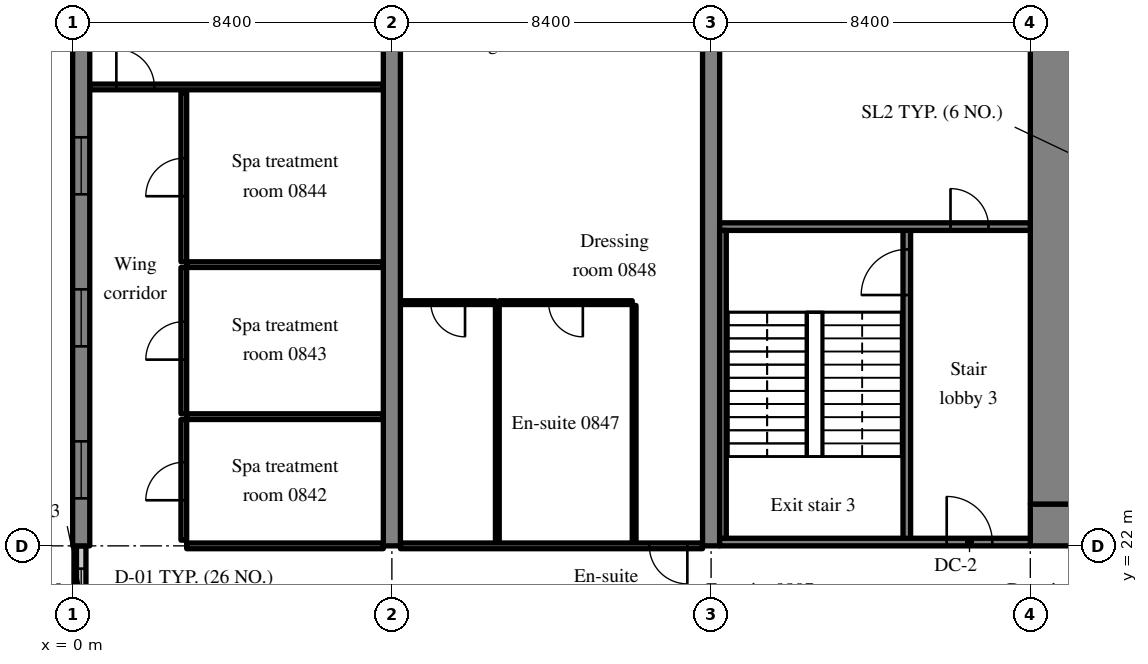
"""IFC4 building model, lengths in metres.
Left out: names, types, materials, properties, quantities, classifications, styles, units other than length and angle.
Written with IfcOpenShell. Run it as: python <this file> out.ifc"""

import sys

from ifc_helpers import new_model, si_unit, direction, frame, frame_2d, origin, place, context, subcontext, project, spatial, rectangle, extrude, source, transform, mapped, element, fill, save


model = new_model("IFC4")
c1 = context("Model", 3, precision=1e-05, world=origin(), true_north=direction((0.0, 1.0)))
c2 = subcontext(c1, "Body", "Model", "MODEL_VIEW")
j1 = project(units=[si_unit("LENGTHUNIT", "METRE"), si_unit("PLANEANGLEUNIT", "RADIAN")], contexts=[c1])
p1 = place(None, origin())
s1 = spatial("IfcSite", under=j1, at=p1, CompositionType="ELEMENT")
p2 = place(p1, origin())
s2 = spatial("IfcBuilding", under=s1, at=p2, CompositionType="ELEMENT")
p3 = place(p2, frame((0.0, 0.0, 39.2)))
s3 = spatial("IfcBuildingStorey", under=s2, at=p3, CompositionType="ELEMENT", Elevation=39.2)
m1 = source(origin(), c2, "Body", "SweptSolid", [
    extrude(rectangle(XDim=50.4, YDim=1.1, at=frame_2d((25.2, 0.0))), origin(), (0.0, 0.0, 1.0), 3.52),
])
p4 = place(p3, frame((25.2, 22.55, 0.0), z_axis=(0.0, 0.0, 1.0), x_axis=(1.0, 0.0, 0.0)))
e1 = element("IfcWall", 1, at=p4, inside=s3, PredefinedType="SHEAR", context=c2, shape_type="MappedRepresentation", body=[
    mapped(m1, transform((0.0, 0.0, 0.0), scale=1.0)),
])
m2 = source(origin(), c2, "Body", "SweptSolid", [
    extrude(rectangle(XDim=1.8, YDim=2.1, at=frame_2d((0.9, 1.05))), frame((0.0, 0.56, 0.0), z_axis=(0.0, -1.0, 0.0), x_axis=(1.0, 0.0, 0.0)), (0.0, 0.0, 1.0), 1.12),
])
p5 = place(p4, frame((15.9, 0.0, 0.0)))
e2 = element("IfcOpeningElement", 2, at=p5, cuts=e1, PredefinedType="OPENING", context=c2, shape_type="MappedRepresentation", body=[
    mapped(m2, transform((0.0, 0.0, 0.0), scale=1.0)),
])
m3 = source(origin(), c2, "Body", "SweptSolid", [
    extrude(rectangle(XDim=1.2, YDim=2.1, at=frame_2d((0.6, 1.05))), frame((0.0, 0.56, 0.0), z_axis=(0.0, -1.0, 0.0), x_axis=(1.0, 0.0, 0.0)), (0.0, 0.0, 1.0), 1.12),
])
p6 = place(p4, frame((27.0, 0.0, 0.0)))
e3 = element("IfcOpeningElement", 3, at=p6, cuts=e1, PredefinedType="OPENING", context=c2, shape_type="MappedRepresentation", body=[
    mapped(m3, transform((0.0, 0.0, 0.0), scale=1.0)),
])
m4 = source(origin(), c2, "Body", "SweptSolid", [
    extrude(rectangle(XDim=0.9, YDim=2.1, at=frame_2d((0.45, 1.05))), frame((0.0, 0.56, 0.0), z_axis=(0.0, -1.0, 0.0), x_axis=(1.0, 0.0, 0.0)), (0.0, 0.0, 1.0), 1.12),
])
p7 = place(p4, frame((33.75, 0.0, 0.0)))
e4 = element("IfcOpeningElement", 4, at=p7, cuts=e1, PredefinedType="OPENING", context=c2, shape_type="MappedRepresentation", body=[
    mapped(m4, transform((0.0, 0.0, 0.0), scale=1.0)),
])
p8 = place(p4, frame((30.75, 0.0, 0.0)))
e5 = element("IfcOpeningElement", 5, at=p8, cuts=e1, PredefinedType="OPENING", context=c2, shape_type="MappedRepresentation", body=[
    mapped(m4, transform((0.0, 0.0, 0.0), scale=1.0)),
])
p9 = place(p4, frame((39.75, 0.0, 0.0)))
e6 = element("IfcOpeningElement", 6, at=p9, cuts=e1, PredefinedType="OPENING", context=c2, shape_type="MappedRepresentation", body=[
    mapped(m4, transform((0.0, 0.0, 0.0), scale=1.0)),
])
p10 = place(p4, frame((36.75, 0.0, 0.0)))
e7 = element("IfcOpeningElement", 7, at=p10, cuts=e1, PredefinedType="OPENING", context=c2, shape_type="MappedRepresentation", body=[
    mapped(m4, transform((0.0, 0.0, 0.0), scale=1.0)),
])
p11 = place(p4, frame((6.425, 0.0, 0.0)))
e8 = element("IfcOpeningElement", 8, at=p11, cuts=e1, PredefinedType="OPENING", context=c2, shape_type="MappedRepresentation", body=[
    mapped(m3, transform((0.0, 0.0, 0.0), scale=1.0)),
])
p12 = place(p4, frame((47.675, 0.0, 0.0)))
e9 = element("IfcOpeningElement", 9, at=p12, cuts=e1, PredefinedType="OPENING", context=c2, shape_type="MappedRepresentation", body=[
    mapped(m3, transform((0.0, 0.0, 0.0), scale=1.0)),
])
m5 = source(origin(), c2, "Body", "SweptSolid", [
    extrude(rectangle(XDim=17.8, YDim=1.1, at=frame_2d((8.9, 0.0))), origin(), (0.0, 0.0, 1.0), 3.52),
])
p13 = place(p3, frame((25.75, 23.1, 0.0), z_axis=(0.0, 0.0, 1.0), x_axis=(0.0, 1.0, 0.0)))
e10 = element("IfcWall", 10, at=p13, inside=s3, PredefinedType="SHEAR", context=c2, shape_type="MappedRepresentation", body=[
    mapped(m5, transform((0.0, 0.0, 0.0), scale=1.0)),
])
m6 = source(origin(), c2, "Body", "SweptSolid", [
    extrude(rectangle(XDim=16.0, YDim=0.45, at=frame_2d((8.0, 0.0))), origin(), (0.0, 0.0, 1.0), 3.52),
])
p14 = place(p3, frame((0.225, 22.0, 0.0), z_axis=(0.0, 0.0, 1.0), x_axis=(0.0, 1.0, 0.0)))
e11 = element("IfcWall", 11, at=p14, inside=s3, PredefinedType="SHEAR", context=c2, shape_type="MappedRepresentation", body=[
    mapped(m6, transform((0.0, 0.0, 0.0), scale=1.0)),
])
m7 = source(origin(), c2, "Body", "SweptSolid", [
    extrude(rectangle(XDim=1.5, YDim=1.5, at=frame_2d((0.75, 0.75))), frame((0.0, 0.235, 0.0), z_axis=(0.0, -1.0, 0.0), x_axis=(1.0, 0.0, 0.0)), (0.0, 0.0, 1.0), 0.47),
])
p15 = place(p14, frame((1.25, 0.0, 0.9)))
e12 = element("IfcOpeningElement", 12, at=p15, cuts=e11, PredefinedType="OPENING", context=c2, shape_type="MappedRepresentation", body=[
    mapped(m7, transform((0.0, 0.0, 0.0), scale=1.0)),
])
p16 = place(p14, frame((5.25, 0.0, 0.9)))
e13 = element("IfcOpeningElement", 13, at=p16, cuts=e11, PredefinedType="OPENING", context=c2, shape_type="MappedRepresentation", body=[
    mapped(m7, transform((0.0, 0.0, 0.0), scale=1.0)),
])
p17 = place(p14, frame((9.25, 0.0, 0.9)))
e14 = element("IfcOpeningElement", 14, at=p17, cuts=e11, PredefinedType="OPENING", context=c2, shape_type="MappedRepresentation", body=[
    mapped(m7, transform((0.0, 0.0, 0.0), scale=1.0)),
])
p18 = place(p14, frame((13.25, 0.0, 0.9)))
e15 = element("IfcOpeningElement", 15, at=p18, cuts=e11, PredefinedType="OPENING", context=c2, shape_type="MappedRepresentation", body=[
    mapped(m7, transform((0.0, 0.0, 0.0), scale=1.0)),
])
m8 = source(origin(), c2, "Body", "SweptSolid", [
    extrude(rectangle(XDim=20.0, YDim=0.45, at=frame_2d((10.0, 0.0))), origin(), (0.0, 0.0, 1.0), 3.52),
])
for number, where, z_axis, x_axis in (
    (16, (8.4, 22.0, 0.0), (0.0, 0.0, 1.0), (0.0, 1.0, 0.0)),
    (17, (16.8, 22.0, 0.0), (0.0, 0.0, 1.0), (0.0, 1.0, 0.0)),
):
    element("IfcWall", number, at=place(p3, frame(where, z_axis=z_axis, x_axis=x_axis)), inside=s3, PredefinedType="SHEAR", context=c2, shape_type="MappedRepresentation", body=[
        mapped(m8, transform((0.0, 0.0, 0.0), scale=1.0)),
    ])
m9 = source(origin(), c2, "Body", "SweptSolid", [
    extrude(rectangle(XDim=2.4, YDim=0.25, at=frame_2d((1.2, 0.0))), origin(), (0.0, 0.0, 1.0), 2.62),
])
p19 = place(p3, frame((0.225, 19.6, 0.0), z_axis=(0.0, 0.0, 1.0), x_axis=(0.0, 1.0, 0.0)))
e18 = element("IfcWall", 18, at=p19, inside=s3, PredefinedType="SOLIDWALL", context=c2, shape_type="MappedRepresentation", body=[
    mapped(m9, transform((0.0, 0.0, 0.0), scale=1.0)),
])
m10 = source(origin(), c2, "Body", "SweptSolid", [
    extrude(rectangle(XDim=1.2, YDim=1.5, at=frame_2d((0.6, 0.75))), frame((0.0, 0.135, 0.0), z_axis=(0.0, -1.0, 0.0), x_axis=(1.0, 0.0, 0.0)), (0.0, 0.0, 1.0), 0.27),
])
p20 = place(p19, frame((0.6, 0.0, 0.9)))
e19 = element("IfcOpeningElement", 19, at=p20, cuts=e18, PredefinedType="OPENING", context=c2, shape_type="MappedRepresentation", body=[
    mapped(m10, transform((0.0, 0.0, 0.0), scale=1.0)),
])
m11 = source(origin(), c2, "Body", "SweptSolid", [
    extrude(rectangle(XDim=8.3, YDim=0.2, at=frame_2d((4.15, 0.0))), origin(), (0.0, 0.0, 1.0), 3.52),
])
p21 = place(p3, frame((21.95, 22.1, 0.0), z_axis=(0.0, 0.0, 1.0), x_axis=(0.0, 1.0, 0.0)))
e20 = element("IfcWall", 20, at=p21, inside=s3, PredefinedType="SOLIDWALL", context=c2, shape_type="MappedRepresentation", body=[
    mapped(m11, transform((0.0, 0.0, 0.0), scale=1.0)),
])
m12 = source(origin(), c2, "Body", "SweptSolid", [
    extrude(rectangle(XDim=1.2, YDim=2.1, at=frame_2d((0.6, 1.05))), frame((0.0, 0.11, 0.0), z_axis=(0.0, -1.0, 0.0), x_axis=(1.0, 0.0, 0.0)), (0.0, 0.0, 1.0), 0.22),
])
p22 = place(p21, frame((6.5, 0.0, 0.0)))
e21 = element("IfcOpeningElement", 21, at=p22, cuts=e20, PredefinedType="OPENING", context=c2, shape_type="MappedRepresentation", body=[
    mapped(m12, transform((0.0, 0.0, 0.0), scale=1.0)),
])
m13 = source(origin(), c2, "Body", "SweptSolid", [
    extrude(rectangle(XDim=8.175, YDim=0.2, at=frame_2d((4.087, 0.0))), origin(), (0.0, 0.0, 1.0), 3.52),
])
p23 = place(p3, frame((17.025, 22.1, 0.0), z_axis=(0.0, 0.0, 1.0), x_axis=(1.0, 0.0, 0.0)))
e22 = element("IfcWall", 22, at=p23, inside=s3, PredefinedType="SOLIDWALL", context=c2, shape_type="MappedRepresentation", body=[
    mapped(m13, transform((0.0, 0.0, 0.0), scale=1.0)),
])
p24 = place(p23, frame((5.975, 0.0, 0.0)))
e23 = element("IfcOpeningElement", 23, at=p24, cuts=e22, PredefinedType="OPENING", context=c2, shape_type="MappedRepresentation", body=[
    mapped(m12, transform((0.0, 0.0, 0.0), scale=1.0)),
])
p25 = place(p3, frame((17.025, 30.4, 0.0), z_axis=(0.0, 0.0, 1.0), x_axis=(1.0, 0.0, 0.0)))
e24 = element("IfcWall", 24, at=p25, inside=s3, PredefinedType="SOLIDWALL", context=c2, shape_type="MappedRepresentation", body=[
    mapped(m13, transform((0.0, 0.0, 0.0), scale=1.0)),
])
m14 = source(origin(), c2, "Body", "SweptSolid", [
    extrude(rectangle(XDim=1.0, YDim=2.1, at=frame_2d((0.5, 1.05))), frame((0.0, 0.11, 0.0), z_axis=(0.0, -1.0, 0.0), x_axis=(1.0, 0.0, 0.0)), (0.0, 0.0, 1.0), 0.22),
])
p26 = place(p25, frame((6.075, 0.0, 0.0)))
e25 = element("IfcOpeningElement", 25, at=p26, cuts=e24, PredefinedType="OPENING", context=c2, shape_type="MappedRepresentation", body=[
    mapped(m14, transform((0.0, 0.0, 0.0), scale=1.0)),
])
m15 = source(origin(), c2, "Body", "SweptSolid", [
    extrude(rectangle(XDim=8.1, YDim=0.175, at=frame_2d((4.05, 0.0))), origin(), (0.0, 0.0, 1.0), 3.52),
])
p27 = place(p3, frame((17.112, 22.2, 0.0), z_axis=(0.0, 0.0, 1.0), x_axis=(0.0, 1.0, 0.0)))
e26 = element("IfcWall", 26, at=p27, inside=s3, PredefinedType="SOLIDWALL", context=c2, shape_type="MappedRepresentation", body=[
    mapped(m15, transform((0.0, 0.0, 0.0), scale=1.0)),
])
m16 = source(origin(), c2, "Body", "SweptSolid", [
    extrude(rectangle(XDim=5.175, YDim=0.15, at=frame_2d((2.587, 0.0))), origin(), (0.0, 0.0, 1.0), 2.82),
])
p28 = place(p3, frame((3.0, 22.0, 0.0), z_axis=(0.0, 0.0, 1.0), x_axis=(1.0, 0.0, 0.0)))
e27 = element("IfcWall", 27, at=p28, inside=s3, PredefinedType="PARTITIONING", context=c2, shape_type="MappedRepresentation", body=[
    mapped(m16, transform((0.0, 0.0, 0.0), scale=1.0)),
])
m17 = source(origin(), c2, "Body", "SweptSolid", [
    extrude(rectangle(XDim=3.175, YDim=0.15, at=frame_2d((1.587, 0.0))), origin(), (0.0, 0.0, 1.0), 3.52),
])
p29 = place(p3, frame((2.925, 22.15, 0.0), z_axis=(0.0, 0.0, 1.0), x_axis=(0.0, 1.0, 0.0)))
e28 = element("IfcWall", 28, at=p29, inside=s3, PredefinedType="PARTITIONING", context=c2, shape_type="MappedRepresentation", body=[
    mapped(m17, transform((0.0, 0.0, 0.0), scale=1.0)),
])
m18 = source(origin(), c2, "Body", "SweptSolid", [
    extrude(rectangle(XDim=1.0, YDim=2.1, at=frame_2d((0.5, 1.05))), frame((0.0, 0.085, 0.0), z_axis=(0.0, -1.0, 0.0), x_axis=(1.0, 0.0, 0.0)), (0.0, 0.0, 1.0), 0.17),
])
p30 = place(p29, frame((1.05, 0.0, 0.0)))
e29 = element("IfcOpeningElement", 29, at=p30, cuts=e28, PredefinedType="OPENING", context=c2, shape_type="MappedRepresentation", body=[
    mapped(m18, transform((0.0, 0.0, 0.0), scale=1.0)),
])
m19 = source(origin(), c2, "Body", "SweptSolid", [
    extrude(rectangle(XDim=5.175, YDim=0.15, at=frame_2d((2.587, 0.0))), origin(), (0.0, 0.0, 1.0), 3.52),
])
p31 = place(p3, frame((3.0, 25.4, 0.0), z_axis=(0.0, 0.0, 1.0), x_axis=(1.0, 0.0, 0.0)))
e30 = element("IfcWall", 30, at=p31, inside=s3, PredefinedType="PARTITIONING", context=c2, shape_type="MappedRepresentation", body=[
    mapped(m19, transform((0.0, 0.0, 0.0), scale=1.0)),
])
m20 = source(origin(), c2, "Body", "SweptSolid", [
    extrude(rectangle(XDim=3.85, YDim=0.15, at=frame_2d((1.925, 0.0))), origin(), (0.0, 0.0, 1.0), 3.52),
])
p32 = place(p3, frame((2.925, 25.475, 0.0), z_axis=(0.0, 0.0, 1.0), x_axis=(0.0, 1.0, 0.0)))
e31 = element("IfcWall", 31, at=p32, inside=s3, PredefinedType="PARTITIONING", context=c2, shape_type="MappedRepresentation", body=[
    mapped(m20, transform((0.0, 0.0, 0.0), scale=1.0)),
])
p33 = place(p32, frame((1.425, 0.0, 0.0)))
e32 = element("IfcOpeningElement", 32, at=p33, cuts=e31, PredefinedType="OPENING", context=c2, shape_type="MappedRepresentation", body=[
    mapped(m18, transform((0.0, 0.0, 0.0), scale=1.0)),
])
p34 = place(p3, frame((3.0, 29.4, 0.0), z_axis=(0.0, 0.0, 1.0), x_axis=(1.0, 0.0, 0.0)))
e33 = element("IfcWall", 33, at=p34, inside=s3, PredefinedType="PARTITIONING", context=c2, shape_type="MappedRepresentation", body=[
    mapped(m19, transform((0.0, 0.0, 0.0), scale=1.0)),
])
m21 = source(origin(), c2, "Body", "SweptSolid", [
    extrude(rectangle(XDim=4.45, YDim=0.15, at=frame_2d((2.225, 0.0))), origin(), (0.0, 0.0, 1.0), 3.52),
])
p35 = place(p3, frame((2.925, 29.475, 0.0), z_axis=(0.0, 0.0, 1.0), x_axis=(0.0, 1.0, 0.0)))
e34 = element("IfcWall", 34, at=p35, inside=s3, PredefinedType="PARTITIONING", context=c2, shape_type="MappedRepresentation", body=[
    mapped(m21, transform((0.0, 0.0, 0.0), scale=1.0)),
])
p36 = place(p35, frame((1.725, 0.0, 0.0)))
e35 = element("IfcOpeningElement", 35, at=p36, cuts=e34, PredefinedType="OPENING", context=c2, shape_type="MappedRepresentation", body=[
    mapped(m18, transform((0.0, 0.0, 0.0), scale=1.0)),
])
m22 = source(origin(), c2, "Body", "SweptSolid", [
    extrude(rectangle(XDim=7.725, YDim=0.15, at=frame_2d((3.863, 0.0))), origin(), (0.0, 0.0, 1.0), 3.52),
])
p37 = place(p3, frame((0.45, 34.075, 0.0), z_axis=(0.0, 0.0, 1.0), x_axis=(1.0, 0.0, 0.0)))
e36 = element("IfcWall", 36, at=p37, inside=s3, PredefinedType="PARTITIONING", context=c2, shape_type="MappedRepresentation", body=[
    mapped(m22, transform((0.0, 0.0, 0.0), scale=1.0)),
])
p38 = place(p37, frame((0.7, 0.0, 0.0)))
e37 = element("IfcOpeningElement", 37, at=p38, cuts=e36, PredefinedType="OPENING", context=c2, shape_type="MappedRepresentation", body=[
    mapped(m18, transform((0.0, 0.0, 0.0), scale=1.0)),
])
m23 = source(origin(), c2, "Body", "SweptSolid", [
    extrude(rectangle(XDim=6.25, YDim=0.1, at=frame_2d((3.125, 0.0))), origin(), (0.0, 0.0, 1.0), 3.52),
])
for number, where, z_axis, x_axis in (
    (38, (14.775, 22.075, 0.0), (0.0, 0.0, 1.0), (0.0, 1.0, 0.0)),
    (39, (11.175, 22.075, 0.0), (0.0, 0.0, 1.0), (0.0, 1.0, 0.0)),
):
    element("IfcWall", number, at=place(p3, frame(where, z_axis=z_axis, x_axis=x_axis)), inside=s3, PredefinedType="PARTITIONING", context=c2, shape_type="MappedRepresentation", body=[
        mapped(m23, transform((0.0, 0.0, 0.0), scale=1.0)),
    ])
m24 = source(origin(), c2, "Body", "SweptSolid", [
    extrude(rectangle(XDim=3.5, YDim=0.1, at=frame_2d((1.75, 0.0))), origin(), (0.0, 0.0, 1.0), 3.52),
])
p39 = place(p3, frame((11.225, 28.4, 0.0), z_axis=(0.0, 0.0, 1.0), x_axis=(1.0, 0.0, 0.0)))
e40 = element("IfcWall", 40, at=p39, inside=s3, PredefinedType="PARTITIONING", context=c2, shape_type="MappedRepresentation", body=[
    mapped(m24, transform((0.0, 0.0, 0.0), scale=1.0)),
])
m25 = source(origin(), c2, "Body", "SweptSolid", [
    extrude(rectangle(XDim=0.9, YDim=2.1, at=frame_2d((0.45, 1.05))), frame((0.0, 0.06, 0.0), z_axis=(0.0, -1.0, 0.0), x_axis=(1.0, 0.0, 0.0)), (0.0, 0.0, 1.0), 0.12),
])
p40 = place(p39, frame((1.3, 0.0, 0.0)))
e41 = element("IfcOpeningElement", 41, at=p40, cuts=e40, PredefinedType="OPENING", context=c2, shape_type="MappedRepresentation", body=[
    mapped(m25, transform((0.0, 0.0, 0.0), scale=1.0)),
])
m26 = source(origin(), c2, "Body", "SweptSolid", [
    extrude(rectangle(XDim=2.5, YDim=0.1, at=frame_2d((1.25, 0.0))), origin(), (0.0, 0.0, 1.0), 3.52),
])
p41 = place(p3, frame((8.625, 28.4, 0.0), z_axis=(0.0, 0.0, 1.0), x_axis=(1.0, 0.0, 0.0)))
e42 = element("IfcWall", 42, at=p41, inside=s3, PredefinedType="PARTITIONING", context=c2, shape_type="MappedRepresentation", body=[
    mapped(m26, transform((0.0, 0.0, 0.0), scale=1.0)),
])
p42 = place(p41, frame((0.8, 0.0, 0.0)))
e43 = element("IfcOpeningElement", 43, at=p42, cuts=e42, PredefinedType="OPENING", context=c2, shape_type="MappedRepresentation", body=[
    mapped(m25, transform((0.0, 0.0, 0.0), scale=1.0)),
])
m27 = source(origin(), c2, "Body", "SweptSolid", [
    extrude(rectangle(XDim=7.95, YDim=0.15, at=frame_2d((3.975, 0.0))), origin(), (0.0, 0.0, 1.0), 2.82),
])
p43 = place(p3, frame((8.625, 22.0, 0.0), z_axis=(0.0, 0.0, 1.0), x_axis=(1.0, 0.0, 0.0)))
e44 = element("IfcWall", 44, at=p43, inside=s3, PredefinedType="PARTITIONING", context=c2, shape_type="MappedRepresentation", body=[
    mapped(m27, transform((0.0, 0.0, 0.0), scale=1.0)),
])
p44 = place(p43, frame((6.55, 0.0, 0.0)))
e45 = element("IfcOpeningElement", 45, at=p44, cuts=e44, PredefinedType="OPENING", context=c2, shape_type="MappedRepresentation", body=[
    mapped(m18, transform((0.0, 0.0, 0.0), scale=1.0)),
])
m28 = source(origin(), c2, "Body", "SweptSolid", [
    extrude(rectangle(XDim=1.5, YDim=1.5, at=frame_2d((0.75, 0.75))), frame((0.0, 0.03, 0.0), z_axis=(0.0, -1.0, 0.0), x_axis=(1.0, 0.0, 0.0)), (0.0, 0.0, 1.0), 0.06),
])
p45 = place(p15, origin())
e46 = element("IfcWindow", 46, at=p45, inside=s3, PartitioningType="SINGLE_PANEL", PredefinedType="WINDOW", context=c2, shape_type="MappedRepresentation", body=[
    mapped(m28, transform((0.0, 0.0, 0.0), scale=1.0)),
])
fill(e12, e46)
p46 = place(p16, origin())
e47 = element("IfcWindow", 47, at=p46, inside=s3, PartitioningType="SINGLE_PANEL", PredefinedType="WINDOW", context=c2, shape_type="MappedRepresentation", body=[
    mapped(m28, transform((0.0, 0.0, 0.0), scale=1.0)),
])
fill(e13, e47)
p47 = place(p17, origin())
e48 = element("IfcWindow", 48, at=p47, inside=s3, PartitioningType="SINGLE_PANEL", PredefinedType="WINDOW", context=c2, shape_type="MappedRepresentation", body=[
    mapped(m28, transform((0.0, 0.0, 0.0), scale=1.0)),
])
fill(e14, e48)
m29 = source(origin(), c2, "Body", "SweptSolid", [
    extrude(rectangle(XDim=1.2, YDim=1.5, at=frame_2d((0.6, 0.75))), frame((0.0, 0.03, 0.0), z_axis=(0.0, -1.0, 0.0), x_axis=(1.0, 0.0, 0.0)), (0.0, 0.0, 1.0), 0.06),
])
p48 = place(p20, origin())
e49 = element("IfcWindow", 49, at=p48, inside=s3, PartitioningType="SINGLE_PANEL", PredefinedType="WINDOW", context=c2, shape_type="MappedRepresentation", body=[
    mapped(m29, transform((0.0, 0.0, 0.0), scale=1.0)),
])
fill(e19, e49)
m30 = source(origin(), c2, "Body", "SweptSolid", [
    extrude(rectangle(XDim=1.2, YDim=2.1, at=frame_2d((0.6, 1.05))), frame((0.0, 0.025, 0.0), z_axis=(0.0, -1.0, 0.0), x_axis=(1.0, 0.0, 0.0)), (0.0, 0.0, 1.0), 0.05),
])
p49 = place(p22, origin())
e50 = element("IfcDoor", 50, at=p49, inside=s3, OperationType="SINGLE_SWING_LEFT", PredefinedType="DOOR", context=c2, shape_type="MappedRepresentation", body=[
    mapped(m30, transform((0.0, 0.0, 0.0), scale=1.0)),
])
fill(e21, e50)
p50 = place(p24, origin())
e51 = element("IfcDoor", 51, at=p50, inside=s3, OperationType="SINGLE_SWING_LEFT", PredefinedType="DOOR", context=c2, shape_type="MappedRepresentation", body=[
    mapped(m30, transform((0.0, 0.0, 0.0), scale=1.0)),
])
fill(e23, e51)
m31 = source(origin(), c2, "Body", "SweptSolid", [
    extrude(rectangle(XDim=1.0, YDim=2.1, at=frame_2d((0.5, 1.05))), frame((0.0, 0.025, 0.0), z_axis=(0.0, -1.0, 0.0), x_axis=(1.0, 0.0, 0.0)), (0.0, 0.0, 1.0), 0.05),
])
p51 = place(p26, origin())
e52 = element("IfcDoor", 52, at=p51, inside=s3, OperationType="SINGLE_SWING_LEFT", PredefinedType="DOOR", context=c2, shape_type="MappedRepresentation", body=[
    mapped(m31, transform((0.0, 0.0, 0.0), scale=1.0)),
])
fill(e25, e52)
p52 = place(p30, origin())
e53 = element("IfcDoor", 53, at=p52, inside=s3, OperationType="SINGLE_SWING_LEFT", PredefinedType="DOOR", context=c2, shape_type="MappedRepresentation", body=[
    mapped(m31, transform((0.0, 0.0, 0.0), scale=1.0)),
])
fill(e29, e53)
p53 = place(p33, origin())
e54 = element("IfcDoor", 54, at=p53, inside=s3, OperationType="SINGLE_SWING_LEFT", PredefinedType="DOOR", context=c2, shape_type="MappedRepresentation", body=[
    mapped(m31, transform((0.0, 0.0, 0.0), scale=1.0)),
])
fill(e32, e54)
p54 = place(p36, origin())
e55 = element("IfcDoor", 55, at=p54, inside=s3, OperationType="SINGLE_SWING_LEFT", PredefinedType="DOOR", context=c2, shape_type="MappedRepresentation", body=[
    mapped(m31, transform((0.0, 0.0, 0.0), scale=1.0)),
])
fill(e35, e55)
p55 = place(p38, origin())
e56 = element("IfcDoor", 56, at=p55, inside=s3, OperationType="SINGLE_SWING_LEFT", PredefinedType="DOOR", context=c2, shape_type="MappedRepresentation", body=[
    mapped(m31, transform((0.0, 0.0, 0.0), scale=1.0)),
])
fill(e37, e56)
m32 = source(origin(), c2, "Body", "SweptSolid", [
    extrude(rectangle(XDim=0.9, YDim=2.1, at=frame_2d((0.45, 1.05))), frame((0.0, 0.025, 0.0), z_axis=(0.0, -1.0, 0.0), x_axis=(1.0, 0.0, 0.0)), (0.0, 0.0, 1.0), 0.05),
])
p56 = place(p40, origin())
e57 = element("IfcDoor", 57, at=p56, inside=s3, OperationType="SINGLE_SWING_RIGHT", PredefinedType="DOOR", context=c2, shape_type="MappedRepresentation", body=[
    mapped(m32, transform((0.0, 0.0, 0.0), scale=1.0)),
])
fill(e41, e57)
p57 = place(p42, origin())
e58 = element("IfcDoor", 58, at=p57, inside=s3, OperationType="SINGLE_SWING_RIGHT", PredefinedType="DOOR", context=c2, shape_type="MappedRepresentation", body=[
    mapped(m32, transform((0.0, 0.0, 0.0), scale=1.0)),
])
fill(e43, e58)
p58 = place(p44, origin())
e59 = element("IfcDoor", 59, at=p58, inside=s3, OperationType="SINGLE_SWING_RIGHT", PredefinedType="DOOR", context=c2, shape_type="MappedRepresentation", body=[
    mapped(m31, transform((0.0, 0.0, 0.0), scale=1.0)),
])
fill(e45, e59)
save(model, sys.argv[1])
